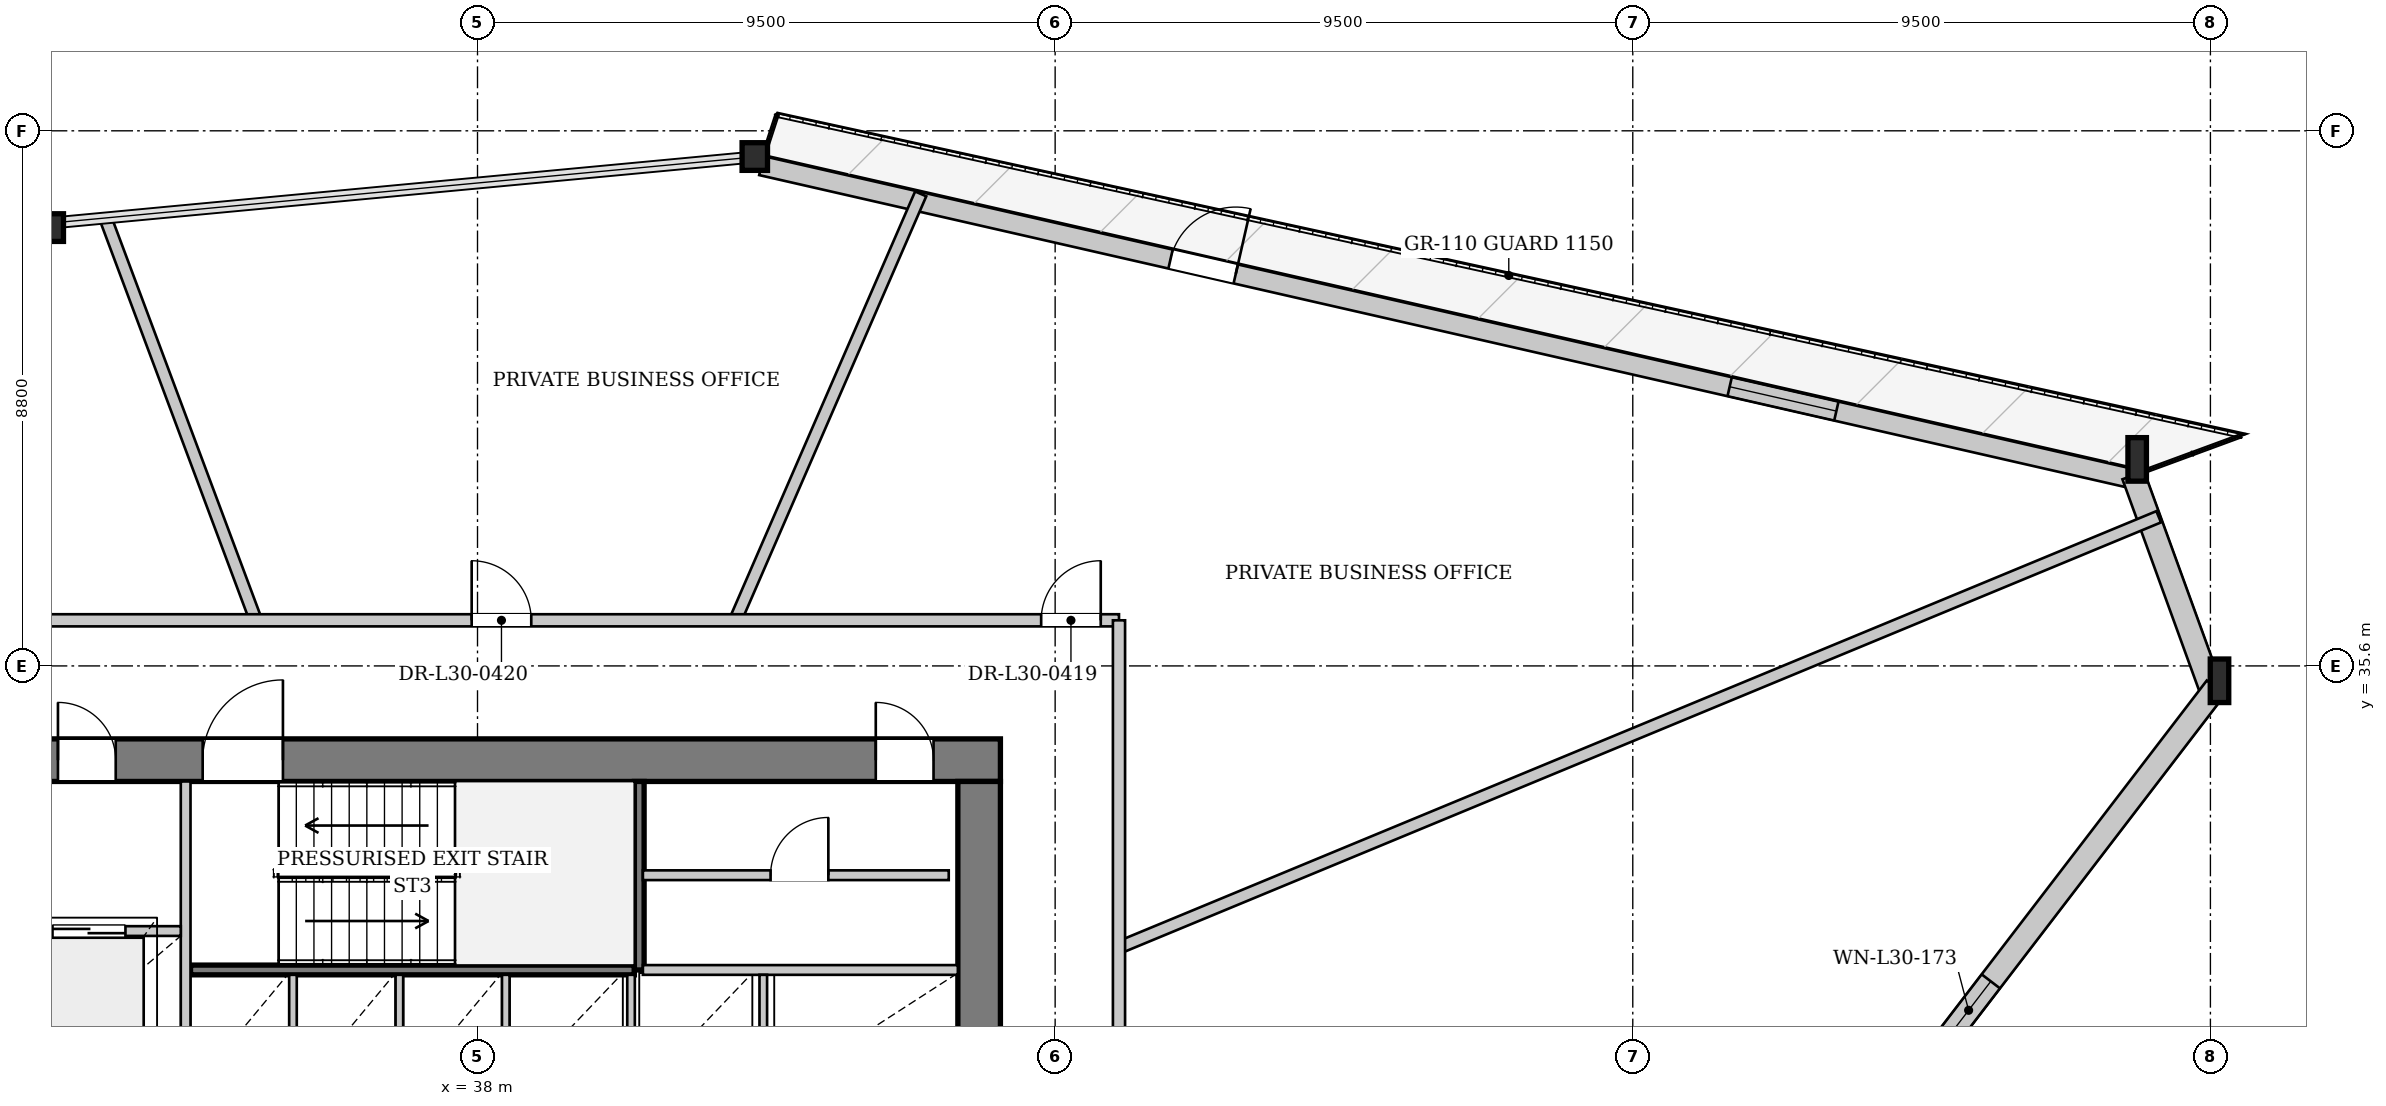
"""IFC4 building model, lengths in metres.
Left out: names, types, materials, properties, quantities, classifications, styles, units other than length and angle.
Written with IfcOpenShell. Run it as: python <this file> out.ifc"""

import sys

from ifc_helpers import new_model, si_unit, direction, frame, frame_2d, origin, origin_2d, place, context, subcontext, project, spatial, rectangle, i_section, extrude, source, transform, mapped, element, fill, save


model = new_model("IFC4")
c1 = context("Model", 3, precision=1e-05, world=origin(), true_north=direction((0.0, 1.0)))
c2 = subcontext(c1, "Body", "Model", "MODEL_VIEW")
j1 = project(units=[si_unit("LENGTHUNIT", "METRE"), si_unit("PLANEANGLEUNIT", "RADIAN")], contexts=[c1])
p1 = place(None, origin())
s1 = spatial("IfcSite", under=j1, at=p1, CompositionType="ELEMENT")
p2 = place(p1, origin())
s2 = spatial("IfcBuilding", under=s1, at=p2, CompositionType="ELEMENT")
p3 = place(p2, frame((0.0, 0.0, 116.35)))
s3 = spatial("IfcBuildingStorey", under=s2, at=p3, CompositionType="ELEMENT", Elevation=116.35)
m1 = source(origin(), c2, "Body", "SweptSolid", [
    extrude(i_section(OverallWidth=0.304, OverallDepth=0.716, WebThickness=0.021, FlangeThickness=0.04, at=origin_2d()), origin(), (0.0, 0.0, 1.0), 3.42),
])
p4 = place(p3, frame((66.742, 35.129, 0.0), z_axis=(-0.054251204611, 0.132273002822, 0.989727568335), x_axis=(-0.925204579621, -0.37946868889, 0.0)))
e1 = element("IfcColumn", 1, at=p4, inside=s3, PredefinedType="COLUMN", context=c2, shape_type="MappedRepresentation", body=[
    mapped(m1, transform((0.0, 0.0, 0.0), x_axis=(1.0, 0.0, 0.0), y_axis=(0.0, 1.0, 0.0), z_axis=(0.0, 0.0, 1.0), scale=1.0)),
])
m2 = source(origin(), c2, "Body", "SweptSolid", [
    extrude(i_section(OverallWidth=0.304, OverallDepth=0.716, WebThickness=0.021, FlangeThickness=0.04, at=origin_2d()), origin(), (0.0, 0.0, 1.0), 3.416),
])
p5 = place(p3, frame((65.41, 38.799, 0.0), z_axis=(-0.067116324205, 0.115648788672, 0.991020058679), x_axis=(-0.86490124279, -0.501942068591, 0.0)))
e2 = element("IfcColumn", 2, at=p5, inside=s3, PredefinedType="COLUMN", context=c2, shape_type="MappedRepresentation", body=[
    mapped(m2, transform((0.0, 0.0, 0.0), x_axis=(1.0, 0.0, 0.0), y_axis=(0.0, 1.0, 0.0), z_axis=(0.0, 0.0, 1.0), scale=1.0)),
])
m3 = source(origin(), c2, "Body", "SweptSolid", [
    extrude(i_section(OverallWidth=0.418, OverallDepth=0.455, WebThickness=0.038, FlangeThickness=0.059, at=origin_2d()), origin(), (0.0, 0.0, 1.0), 3.397),
])
p6 = place(p3, frame((42.704, 43.984, 0.0), z_axis=(-0.084442368201, -0.004096353181, 0.996419944774), x_axis=(0.048453659237, -0.998825431648, 0.0)))
e3 = element("IfcColumn", 3, at=p6, inside=s3, PredefinedType="COLUMN", context=c2, shape_type="MappedRepresentation", body=[
    mapped(m3, transform((0.0, 0.0, 0.0), x_axis=(1.0, 0.0, 0.0), y_axis=(0.0, 1.0, 0.0), z_axis=(0.0, 0.0, 1.0), scale=1.0)),
])
m4 = source(origin(), c2, "Body", "SweptSolid", [
    extrude(i_section(OverallWidth=0.418, OverallDepth=0.455, WebThickness=0.038, FlangeThickness=0.059, at=origin_2d()), origin(), (0.0, 0.0, 1.0), 3.399),
])
p7 = place(p3, frame((31.11, 42.894, 0.0), z_axis=(-0.075203984266, -0.050351473707, 0.995896124024), x_axis=(0.556347454187, -0.830949763957, 0.0)))
e4 = element("IfcColumn", 4, at=p7, inside=s3, PredefinedType="COLUMN", context=c2, shape_type="MappedRepresentation", body=[
    mapped(m4, transform((0.0, 0.0, 0.0), x_axis=(1.0, 0.0, 0.0), y_axis=(0.0, 1.0, 0.0), z_axis=(0.0, 0.0, 1.0), scale=1.0)),
])
p8 = place(p3, frame((42.668, 43.828, 0.0), z_axis=(0.0, 0.0, 1.0), x_axis=(0.974904675979, -0.222622713923, 0.0)))
e5 = element("IfcWall", 5, at=p8, inside=s3, PredefinedType="SOLIDWALL", context=c2, shape_type="SweptSolid", body=[
    extrude(rectangle(XDim=23.291, YDim=0.32, at=frame_2d((11.646, 0.0))), origin(), (0.0, 0.0, 1.0), 2.692),
])
p9 = place(p8, frame((6.903, 0.0, 0.0)))
e6 = element("IfcOpeningElement", 6, at=p9, cuts=e5, PredefinedType="OPENING", context=c2, shape_type="SweptSolid", body=[
    extrude(rectangle(XDim=1.1, YDim=2.3, at=frame_2d((0.55, 1.15))), frame((0.0, 0.17, 0.0), z_axis=(0.0, -1.0, 0.0), x_axis=(1.0, 0.0, 0.0)), (0.0, 0.0, 1.0), 0.34),
])
p10 = place(p8, frame((16.335, 0.0, 0.372)))
e7 = element("IfcOpeningElement", 7, at=p10, cuts=e5, PredefinedType="OPENING", context=c2, shape_type="SweptSolid", body=[
    extrude(rectangle(XDim=1.8, YDim=2.2, at=frame_2d((0.9, 1.1))), frame((0.0, 0.17, 0.0), z_axis=(0.0, -1.0, 0.0), x_axis=(1.0, 0.0, 0.0)), (0.0, 0.0, 1.0), 0.34),
])
p11 = place(p3, frame((65.232, 38.734, 0.0), z_axis=(0.0, 0.0, 1.0), x_axis=(0.341220774619, -0.93998318228, 0.0)))
e8 = element("IfcWall", 8, at=p11, inside=s3, PredefinedType="SOLIDWALL", context=c2, shape_type="SweptSolid", body=[
    extrude(rectangle(XDim=3.904, YDim=0.38, at=frame_2d((1.952, 0.0))), origin(), (0.0, 0.0, 1.0), 2.692),
])
p12 = place(p3, frame((66.591, 35.245, 0.0), z_axis=(0.0, 0.0, 1.0), x_axis=(-0.608252150968, -0.7937438635, 0.0)))
e9 = element("IfcWall", 9, at=p12, inside=s3, PredefinedType="SOLIDWALL", context=c2, shape_type="SweptSolid", body=[
    extrude(rectangle(XDim=23.887, YDim=0.38, at=frame_2d((11.944, 0.0))), origin(), (0.0, 0.0, 1.0), 2.692),
])
p13 = place(p12, frame((6.088, 0.0, 0.65)))
e10 = element("IfcOpeningElement", 10, at=p13, cuts=e9, PredefinedType="OPENING", context=c2, shape_type="SweptSolid", body=[
    extrude(rectangle(XDim=1.2, YDim=1.5, at=frame_2d((0.6, 0.75))), frame((0.0, 0.2, 0.0), z_axis=(0.0, -1.0, 0.0), x_axis=(1.0, 0.0, 0.0)), (0.0, 0.0, 1.0), 0.4),
])
p14 = place(p12, frame((16.599, 0.0, 0.65)))
e11 = element("IfcOpeningElement", 11, at=p14, cuts=e9, PredefinedType="OPENING", context=c2, shape_type="SweptSolid", body=[
    extrude(rectangle(XDim=1.2, YDim=1.5, at=frame_2d((0.6, 0.75))), frame((0.0, 0.2, 0.0), z_axis=(0.0, -1.0, 0.0), x_axis=(1.0, 0.0, 0.0)), (0.0, 0.0, 1.0), 0.4),
])
p15 = place(p3, frame((29.4, 34.05, 0.0), z_axis=(0.0, 0.0, 1.0), x_axis=(1.0, 0.0, 0.0)))
e12 = element("IfcWall", 12, at=p15, inside=s3, PredefinedType="SHEAR", context=c2, shape_type="SweptSolid", body=[
    extrude(rectangle(XDim=17.2, YDim=0.7, at=frame_2d((8.6, 0.0))), origin(), (0.0, 0.0, 1.0), 3.3),
])
p16 = place(p15, frame((1.7, 0.0, 0.0)))
e13 = element("IfcOpeningElement", 13, at=p16, cuts=e12, PredefinedType="OPENING", context=c2, shape_type="SweptSolid", body=[
    extrude(rectangle(XDim=0.95, YDim=2.1, at=frame_2d((0.475, 1.05))), frame((0.0, 0.36, 0.0), z_axis=(0.0, -1.0, 0.0), x_axis=(1.0, 0.0, 0.0)), (0.0, 0.0, 1.0), 0.72),
])
p17 = place(p15, frame((4.08, 0.0, 0.0)))
e14 = element("IfcOpeningElement", 14, at=p17, cuts=e12, PredefinedType="OPENING", context=c2, shape_type="SweptSolid", body=[
    extrude(rectangle(XDim=1.32, YDim=2.2, at=frame_2d((0.66, 1.1))), frame((0.0, 0.36, 0.0), z_axis=(0.0, -1.0, 0.0), x_axis=(1.0, 0.0, 0.0)), (0.0, 0.0, 1.0), 0.72),
])
p18 = place(p15, frame((15.15, 0.0, 0.0)))
e15 = element("IfcOpeningElement", 15, at=p18, cuts=e12, PredefinedType="OPENING", context=c2, shape_type="SweptSolid", body=[
    extrude(rectangle(XDim=0.95, YDim=2.1, at=frame_2d((0.475, 1.05))), frame((0.0, 0.36, 0.0), z_axis=(0.0, -1.0, 0.0), x_axis=(1.0, 0.0, 0.0)), (0.0, 0.0, 1.0), 0.72),
])
p19 = place(p3, frame((46.25, 33.7, 0.0), z_axis=(0.0, 0.0, 1.0), x_axis=(0.0, -1.0, 0.0)))
e16 = element("IfcWall", 16, at=p19, inside=s3, PredefinedType="SHEAR", context=c2, shape_type="SweptSolid", body=[
    extrude(rectangle(XDim=14.2, YDim=0.7, at=frame_2d((7.1, 0.0))), origin(), (0.0, 0.0, 1.0), 3.3),
])
p20 = place(p19, frame((5.18, 0.0, 0.0)))
e17 = element("IfcOpeningElement", 17, at=p20, cuts=e16, PredefinedType="OPENING", context=c2, shape_type="SweptSolid", body=[
    extrude(rectangle(XDim=1.6, YDim=2.2, at=frame_2d((0.8, 1.1))), frame((0.0, 0.36, 0.0), z_axis=(0.0, -1.0, 0.0), x_axis=(1.0, 0.0, 0.0)), (0.0, 0.0, 1.0), 0.72),
])
p21 = place(p3, frame((33.28, 30.6, 0.0), z_axis=(0.0, 0.0, 1.0), x_axis=(1.0, 0.0, 0.0)))
e18 = element("IfcWall", 18, at=p21, inside=s3, PredefinedType="PARTITIONING", context=c2, shape_type="SweptSolid", body=[
    extrude(rectangle(XDim=7.3, YDim=0.16, at=frame_2d((3.65, 0.0))), origin(), (0.0, 0.0, 1.0), 3.3),
])
p22 = place(p3, frame((40.66, 30.6, 0.0), z_axis=(0.0, 0.0, 1.0), x_axis=(0.0, 1.0, 0.0)))
e19 = element("IfcWall", 19, at=p22, inside=s3, PredefinedType="PARTITIONING", context=c2, shape_type="SweptSolid", body=[
    extrude(rectangle(XDim=3.1, YDim=0.16, at=frame_2d((1.55, 0.0))), origin(), (0.0, 0.0, 1.0), 3.3),
])
p23 = place(p3, frame((33.2, 28.44, 0.0), z_axis=(0.0, 0.0, 1.0), x_axis=(0.0, 1.0, 0.0)))
e20 = element("IfcWall", 20, at=p23, inside=s3, PredefinedType="PARTITIONING", context=c2, shape_type="SweptSolid", body=[
    extrude(rectangle(XDim=5.26, YDim=0.16, at=frame_2d((2.63, 0.0))), origin(), (0.0, 0.0, 1.0), 3.3),
])
p24 = place(p3, frame((30.1, 31.24, 0.0), z_axis=(0.0, 0.0, 1.0), x_axis=(1.0, 0.0, 0.0)))
e21 = element("IfcWall", 21, at=p24, inside=s3, PredefinedType="PARTITIONING", context=c2, shape_type="SweptSolid", body=[
    extrude(rectangle(XDim=3.02, YDim=0.16, at=frame_2d((1.51, 0.0))), origin(), (0.0, 0.0, 1.0), 3.3),
])
p25 = place(p24, frame((0.91, 0.0, 0.0)))
e22 = element("IfcOpeningElement", 22, at=p25, cuts=e21, PredefinedType="OPENING", context=c2, shape_type="SweptSolid", body=[
    extrude(rectangle(XDim=1.2, YDim=2.2, at=frame_2d((0.6, 1.1))), frame((0.0, 0.09, 0.0), z_axis=(0.0, -1.0, 0.0), x_axis=(1.0, 0.0, 0.0)), (0.0, 0.0, 1.0), 0.18),
])
p26 = place(p3, frame((40.72, 30.6, 0.0), z_axis=(0.0, 0.0, 1.0), x_axis=(1.0, 0.0, 0.0)))
e23 = element("IfcWall", 23, at=p26, inside=s3, PredefinedType="PARTITIONING", context=c2, shape_type="SweptSolid", body=[
    extrude(rectangle(XDim=5.18, YDim=0.16, at=frame_2d((2.59, 0.0))), origin(), (0.0, 0.0, 1.0), 3.3),
])
for number, where, z_axis, x_axis in (
    (24, (34.965, 28.6, 0.0), (0.0, 0.0, 1.0), (0.0, 1.0, 0.0)),
    (25, (36.715, 28.6, 0.0), (0.0, 0.0, 1.0), (0.0, 1.0, 0.0)),
    (26, (38.465, 28.6, 0.0), (0.0, 0.0, 1.0), (0.0, 1.0, 0.0)),
    (27, (40.525, 28.6, 0.0), (0.0, 0.0, 1.0), (0.0, 1.0, 0.0)),
    (28, (42.7, 28.6, 0.0), (0.0, 0.0, 1.0), (0.0, 1.0, 0.0)),
):
    element("IfcWall", number, at=place(p3, frame(where, z_axis=z_axis, x_axis=x_axis)), inside=s3, PredefinedType="PARTITIONING", context=c2, shape_type="SweptSolid", body=[
        extrude(rectangle(XDim=1.92, YDim=0.125, at=frame_2d((0.96, 0.0))), origin(), (0.0, 0.0, 1.0), 3.3),
    ])
p27 = place(p3, frame((40.72, 32.158, 0.0), z_axis=(0.0, 0.0, 1.0), x_axis=(1.0, 0.0, 0.0)))
e29 = element("IfcWall", 29, at=p27, inside=s3, PredefinedType="PARTITIONING", context=c2, shape_type="SweptSolid", body=[
    extrude(rectangle(XDim=5.03, YDim=0.16, at=frame_2d((2.515, 0.0))), origin(), (0.0, 0.0, 1.0), 3.3),
])
p28 = place(p27, frame((2.1, 0.0, 0.0)))
e30 = element("IfcOpeningElement", 30, at=p28, cuts=e29, PredefinedType="OPENING", context=c2, shape_type="SweptSolid", body=[
    extrude(rectangle(XDim=0.95, YDim=2.1, at=frame_2d((0.475, 1.05))), frame((0.0, 0.09, 0.0), z_axis=(0.0, -1.0, 0.0), x_axis=(1.0, 0.0, 0.0)), (0.0, 0.0, 1.0), 0.18),
])
p29 = place(p3, frame((48.55, 30.97, 0.0), z_axis=(0.0, 0.0, 1.0), x_axis=(0.923878084322, 0.382686928585, 0.0)))
e31 = element("IfcWall", 31, at=p29, inside=s3, PredefinedType="PARTITIONING", context=c2, shape_type="SweptSolid", body=[
    extrude(rectangle(XDim=18.508, YDim=0.2, at=frame_2d((9.254, 0.0))), origin(), (0.0, 0.0, 1.0), 3.3),
])
p30 = place(p3, frame((42.24, 36.35, 0.0), z_axis=(0.0, 0.0, 1.0), x_axis=(0.39876113376, 0.917054828351, 0.0)))
e32 = element("IfcWall", 32, at=p30, inside=s3, PredefinedType="PARTITIONING", context=c2, shape_type="SweptSolid", body=[
    extrude(rectangle(XDim=7.647, YDim=0.2, at=frame_2d((3.823, 0.0))), origin(), (0.0, 0.0, 1.0), 3.3),
])
p31 = place(p3, frame((34.354, 36.35, 0.0), z_axis=(0.0, 0.0, 1.0), x_axis=(-0.350202617088, 0.936673970485, 0.0)))
e33 = element("IfcWall", 33, at=p31, inside=s3, PredefinedType="PARTITIONING", context=c2, shape_type="SweptSolid", body=[
    extrude(rectangle(XDim=7.033, YDim=0.2, at=frame_2d((3.516, 0.0))), origin(), (0.0, 0.0, 1.0), 3.3),
])
p32 = place(p3, frame((27.45, 36.35, 0.0), z_axis=(0.0, 0.0, 1.0), x_axis=(1.0, 0.0, 0.0)))
e34 = element("IfcWall", 34, at=p32, inside=s3, PredefinedType="PARTITIONING", context=c2, shape_type="SweptSolid", body=[
    extrude(rectangle(XDim=21.1, YDim=0.2, at=frame_2d((10.55, 0.0))), origin(), (0.0, 0.0, 1.0), 3.3),
])
p33 = place(p32, frame((19.82, 0.0, 0.0)))
e35 = element("IfcOpeningElement", 35, at=p33, cuts=e34, PredefinedType="OPENING", context=c2, shape_type="SweptSolid", body=[
    extrude(rectangle(XDim=0.98, YDim=2.15, at=frame_2d((0.49, 1.075))), frame((0.0, 0.11, 0.0), z_axis=(0.0, -1.0, 0.0), x_axis=(1.0, 0.0, 0.0)), (0.0, 0.0, 1.0), 0.22),
])
p34 = place(p32, frame((10.454, 0.0, 0.0)))
e36 = element("IfcOpeningElement", 36, at=p34, cuts=e34, PredefinedType="OPENING", context=c2, shape_type="SweptSolid", body=[
    extrude(rectangle(XDim=0.98, YDim=2.15, at=frame_2d((0.49, 1.075))), frame((0.0, 0.11, 0.0), z_axis=(0.0, -1.0, 0.0), x_axis=(1.0, 0.0, 0.0)), (0.0, 0.0, 1.0), 0.22),
])
p35 = place(p3, frame((48.55, 16.85, 0.0), z_axis=(0.0, 0.0, 1.0), x_axis=(0.0, 1.0, 0.0)))
e37 = element("IfcWall", 37, at=p35, inside=s3, PredefinedType="PARTITIONING", context=c2, shape_type="SweptSolid", body=[
    extrude(rectangle(XDim=19.5, YDim=0.2, at=frame_2d((9.75, 0.0))), origin(), (0.0, 0.0, 1.0), 3.3),
])
p36 = place(p35, frame((9.368, 0.0, 0.0)))
e38 = element("IfcOpeningElement", 38, at=p36, cuts=e37, PredefinedType="OPENING", context=c2, shape_type="SweptSolid", body=[
    extrude(rectangle(XDim=0.98, YDim=2.15, at=frame_2d((0.49, 1.075))), frame((0.0, 0.11, 0.0), z_axis=(0.0, -1.0, 0.0), x_axis=(1.0, 0.0, 0.0)), (0.0, 0.0, 1.0), 0.22),
])
m5 = source(origin(), c2, "Body", "SweptSolid", [
    extrude(rectangle(XDim=1.1, YDim=2.3, at=frame_2d((0.55, 1.15))), frame((0.0, 0.025, 0.0), z_axis=(0.0, -1.0, 0.0), x_axis=(1.0, 0.0, 0.0)), (0.0, 0.0, 1.0), 0.05),
])
p37 = place(p9, origin())
e39 = element("IfcDoor", 39, at=p37, inside=s3, OperationType="SINGLE_SWING_RIGHT", PredefinedType="DOOR", context=c2, shape_type="MappedRepresentation", body=[
    mapped(m5, transform((0.0, 0.0, 0.0), x_axis=(1.0, 0.0, 0.0), y_axis=(0.0, 1.0, 0.0), z_axis=(0.0, 0.0, 1.0), scale=1.0)),
])
fill(e6, e39)
m6 = source(origin(), c2, "Body", "SweptSolid", [
    extrude(rectangle(XDim=1.8, YDim=2.2, at=frame_2d((0.9, 1.1))), frame((0.0, 0.03, 0.0), z_axis=(0.0, -1.0, 0.0), x_axis=(1.0, 0.0, 0.0)), (0.0, 0.0, 1.0), 0.06),
])
p38 = place(p10, origin())
e40 = element("IfcWindow", 40, at=p38, inside=s3, PartitioningType="SINGLE_PANEL", PredefinedType="WINDOW", context=c2, shape_type="MappedRepresentation", body=[
    mapped(m6, transform((0.0, 0.0, 0.0), x_axis=(1.0, 0.0, 0.0), y_axis=(0.0, 1.0, 0.0), z_axis=(0.0, 0.0, 1.0), scale=1.0)),
])
fill(e7, e40)
m7 = source(origin(), c2, "Body", "SweptSolid", [
    extrude(rectangle(XDim=1.2, YDim=1.5, at=frame_2d((0.6, 0.75))), frame((0.0, 0.03, 0.0), z_axis=(0.0, -1.0, 0.0), x_axis=(1.0, 0.0, 0.0)), (0.0, 0.0, 1.0), 0.06),
])
p39 = place(p13, origin())
e41 = element("IfcWindow", 41, at=p39, inside=s3, PartitioningType="SINGLE_PANEL", PredefinedType="WINDOW", context=c2, shape_type="MappedRepresentation", body=[
    mapped(m7, transform((0.0, 0.0, 0.0), x_axis=(1.0, 0.0, 0.0), y_axis=(0.0, 1.0, 0.0), z_axis=(0.0, 0.0, 1.0), scale=1.0)),
])
fill(e10, e41)
m8 = source(origin(), c2, "Body", "SweptSolid", [
    extrude(rectangle(XDim=0.95, YDim=2.1, at=frame_2d((0.475, 1.05))), frame((0.0, 0.025, 0.0), z_axis=(0.0, -1.0, 0.0), x_axis=(1.0, 0.0, 0.0)), (0.0, 0.0, 1.0), 0.05),
])
p40 = place(p16, origin())
e42 = element("IfcDoor", 42, at=p40, inside=s3, OperationType="SINGLE_SWING_LEFT", PredefinedType="DOOR", context=c2, shape_type="MappedRepresentation", body=[
    mapped(m8, transform((0.0, 0.0, 0.0), x_axis=(1.0, 0.0, 0.0), y_axis=(0.0, 1.0, 0.0), z_axis=(0.0, 0.0, 1.0), scale=1.0)),
])
fill(e13, e42)
m9 = source(origin(), c2, "Body", "SweptSolid", [
    extrude(rectangle(XDim=1.32, YDim=2.2, at=frame_2d((0.66, 1.1))), frame((0.0, 0.025, 0.0), z_axis=(0.0, -1.0, 0.0), x_axis=(1.0, 0.0, 0.0)), (0.0, 0.0, 1.0), 0.05),
])
p41 = place(p17, origin())
e43 = element("IfcDoor", 43, at=p41, inside=s3, OperationType="SINGLE_SWING_RIGHT", PredefinedType="DOOR", context=c2, shape_type="MappedRepresentation", body=[
    mapped(m9, transform((0.0, 0.0, 0.0), x_axis=(1.0, 0.0, 0.0), y_axis=(0.0, 1.0, 0.0), z_axis=(0.0, 0.0, 1.0), scale=1.0)),
])
fill(e14, e43)
m10 = source(origin(), c2, "Body", "SweptSolid", [
    extrude(rectangle(XDim=1.2, YDim=2.2, at=frame_2d((0.6, 1.1))), frame((0.0, 0.025, 0.0), z_axis=(0.0, -1.0, 0.0), x_axis=(1.0, 0.0, 0.0)), (0.0, 0.0, 1.0), 0.05),
])
p42 = place(p25, origin())
e44 = element("IfcDoor", 44, at=p42, inside=s3, OperationType="DOUBLE_DOOR_SLIDING", PredefinedType="DOOR", context=c2, shape_type="MappedRepresentation", body=[
    mapped(m10, transform((0.0, 0.0, 0.0), x_axis=(1.0, 0.0, 0.0), y_axis=(0.0, 1.0, 0.0), z_axis=(0.0, 0.0, 1.0), scale=1.0)),
])
fill(e22, e44)
p43 = place(p28, origin())
e45 = element("IfcDoor", 45, at=p43, inside=s3, OperationType="SINGLE_SWING_RIGHT", PredefinedType="DOOR", context=c2, shape_type="MappedRepresentation", body=[
    mapped(m8, transform((0.0, 0.0, 0.0), x_axis=(1.0, 0.0, 0.0), y_axis=(0.0, 1.0, 0.0), z_axis=(0.0, 0.0, 1.0), scale=1.0)),
])
fill(e30, e45)
p44 = place(p18, origin())
e46 = element("IfcDoor", 46, at=p44, inside=s3, OperationType="SINGLE_SWING_LEFT", PredefinedType="DOOR", context=c2, shape_type="MappedRepresentation", body=[
    mapped(m8, transform((0.0, 0.0, 0.0), x_axis=(1.0, 0.0, 0.0), y_axis=(0.0, 1.0, 0.0), z_axis=(0.0, 0.0, 1.0), scale=1.0)),
])
fill(e15, e46)
m11 = source(origin(), c2, "Body", "SweptSolid", [
    extrude(rectangle(XDim=0.98, YDim=2.15, at=frame_2d((0.49, 1.075))), frame((0.0, 0.025, 0.0), z_axis=(0.0, -1.0, 0.0), x_axis=(1.0, 0.0, 0.0)), (0.0, 0.0, 1.0), 0.05),
])
p45 = place(p33, origin())
e47 = element("IfcDoor", 47, at=p45, inside=s3, OperationType="SINGLE_SWING_RIGHT", PredefinedType="DOOR", context=c2, shape_type="MappedRepresentation", body=[
    mapped(m11, transform((0.0, 0.0, 0.0), x_axis=(1.0, 0.0, 0.0), y_axis=(0.0, 1.0, 0.0), z_axis=(0.0, 0.0, 1.0), scale=1.0)),
])
fill(e35, e47)
p46 = place(p34, origin())
e48 = element("IfcDoor", 48, at=p46, inside=s3, OperationType="SINGLE_SWING_LEFT", PredefinedType="DOOR", context=c2, shape_type="MappedRepresentation", body=[
    mapped(m11, transform((0.0, 0.0, 0.0), x_axis=(1.0, 0.0, 0.0), y_axis=(0.0, 1.0, 0.0), z_axis=(0.0, 0.0, 1.0), scale=1.0)),
])
fill(e36, e48)
save(model, sys.argv[1])
